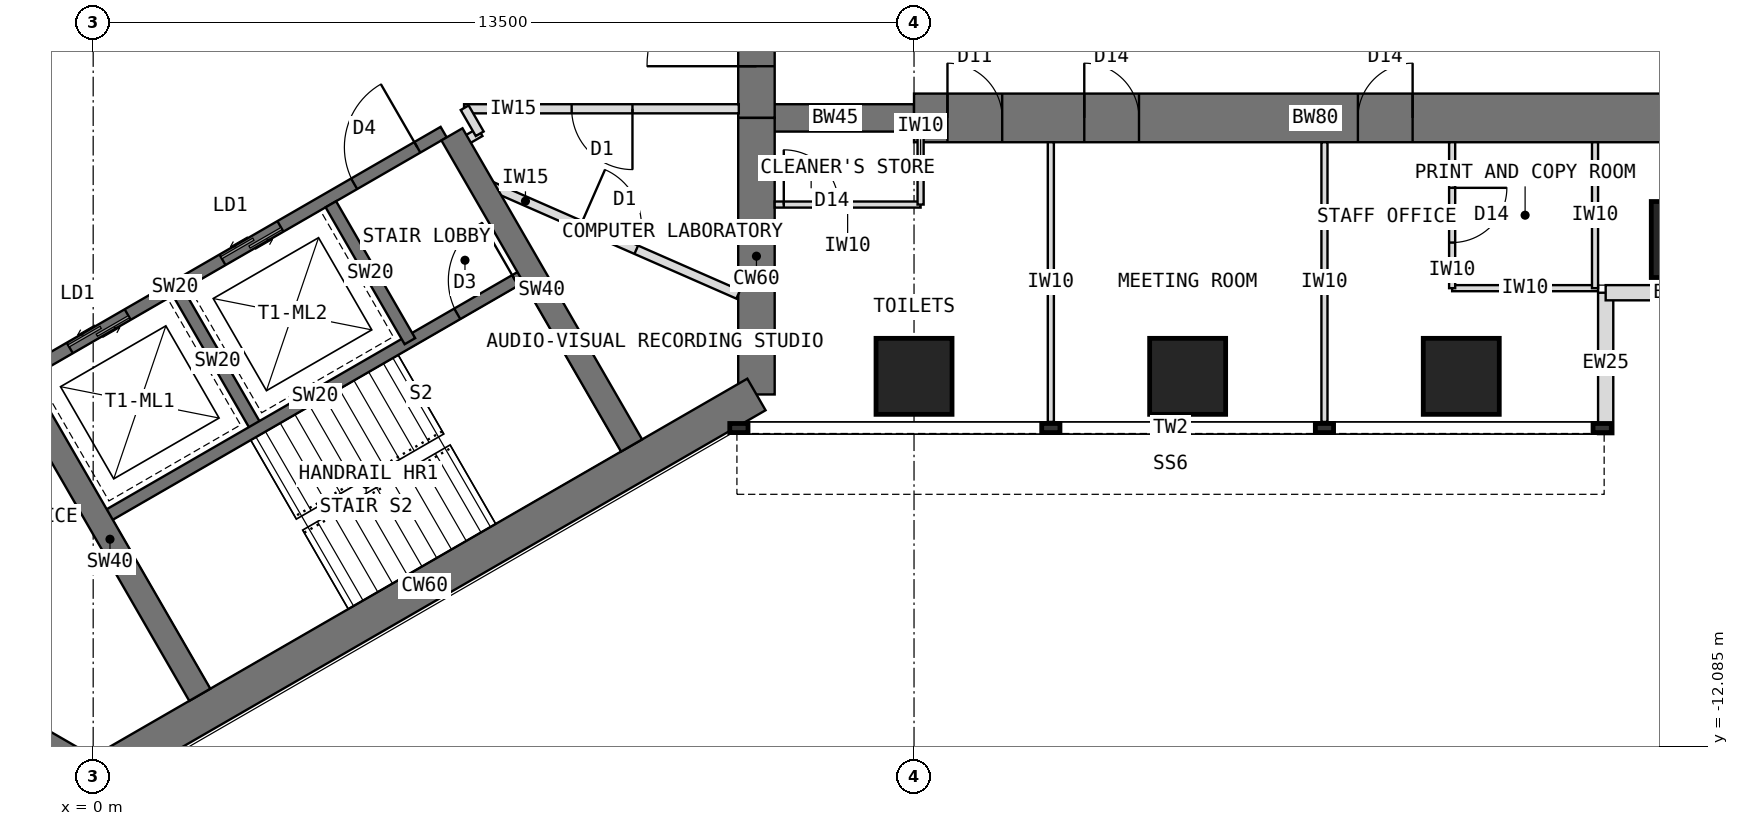
"""IFC4 building model, lengths in metres.
Left out: names, types, materials, properties, quantities, classifications, styles, units other than length and angle.
Written with IfcOpenShell. Run it as: python <this file> out.ifc"""

import sys

from ifc_helpers import new_model, si_unit, direction, frame, frame_2d, origin, origin_2d, place, context, subcontext, project, spatial, rectangle, extrude, element, fill, save


model = new_model("IFC4")
c1 = context("Model", 3, precision=1e-05, world=origin(), true_north=direction((0.0, 1.0)))
c2 = subcontext(c1, "Body", "Model", "MODEL_VIEW")
j1 = project(units=[si_unit("LENGTHUNIT", "METRE"), si_unit("PLANEANGLEUNIT", "RADIAN")], contexts=[c1])
p1 = place(None, origin())
s1 = spatial("IfcSite", under=j1, at=p1, CompositionType="ELEMENT")
p2 = place(p1, origin())
s2 = spatial("IfcBuilding", under=s1, at=p2, CompositionType="ELEMENT")
p3 = place(p2, frame((0.0, 0.0, 145.5)))
s3 = spatial("IfcBuildingStorey", under=s2, at=p3, CompositionType="ELEMENT", Elevation=145.5)
p4 = place(p3, frame((10.908, -6.298, 0.0), z_axis=(0.0, 0.0, 1.0), x_axis=(0.0, 1.0, 0.0)))
e1 = element("IfcWall", 1, at=p4, inside=s3, PredefinedType="SHEAR", context=c2, shape_type="SweptSolid", body=[
    extrude(rectangle(XDim=4.548, YDim=0.6, at=frame_2d((2.274, 0.0))), origin(), (0.0, 0.0, 1.0), 4.0),
])
p5 = place(p3, frame((10.908, -1.75, 0.0), z_axis=(0.0, 0.0, 1.0), x_axis=(0.0, 1.0, 0.0)))
e2 = element("IfcWall", 2, at=p5, inside=s3, PredefinedType="SHEAR", context=c2, shape_type="SweptSolid", body=[
    extrude(rectangle(XDim=3.5, YDim=0.6, at=frame_2d((1.75, 0.0))), origin(), (0.0, 0.0, 1.0), 4.0),
])
p6 = place(p5, frame((0.85, 0.0, 0.0)))
e3 = element("IfcOpeningElement", 3, at=p6, cuts=e2, PredefinedType="OPENING", context=c2, shape_type="SweptSolid", body=[
    extrude(rectangle(XDim=1.8, YDim=2.1, at=frame_2d((0.9, 1.05))), frame((0.0, 0.31, 0.0), z_axis=(0.0, -1.0, 0.0), x_axis=(1.0, 0.0, 0.0)), (0.0, 0.0, 1.0), 0.62),
])
p7 = place(p3, frame((-3.939, -10.322, 0.0), z_axis=(0.0, 0.0, 1.0), x_axis=(0.866011268655, -0.500024481964, 0.0)))
e4 = element("IfcWall", 4, at=p7, inside=s3, PredefinedType="SHEAR", context=c2, shape_type="SweptSolid", body=[
    extrude(rectangle(XDim=4.548, YDim=0.6, at=frame_2d((2.274, 0.0))), origin(), (0.0, 0.0, 1.0), 4.0),
])
p8 = place(p3, frame((0.0, -12.596, 0.0), z_axis=(0.0, 0.0, 1.0), x_axis=(0.866021940709, 0.500005998175, 0.0)))
e5 = element("IfcWall", 5, at=p8, inside=s3, PredefinedType="SHEAR", context=c2, shape_type="SweptSolid", body=[
    extrude(rectangle(XDim=12.596, YDim=0.6, at=frame_2d((6.298, 0.0))), origin(), (0.0, 0.0, 1.0), 4.0),
])
p9 = place(p3, frame((10.908, -1.75, 0.0), z_axis=(0.0, 0.0, 1.0), x_axis=(1.0, 0.0, 0.0)))
e6 = element("IfcWall", 6, at=p9, inside=s3, PredefinedType="SHEAR", context=c2, shape_type="SweptSolid", body=[
    extrude(rectangle(XDim=2.592, YDim=0.45, at=frame_2d((1.296, 0.0))), origin(), (0.0, 0.0, 1.0), 4.0),
])
p10 = place(p3, frame((13.5, -1.75, 0.0), z_axis=(0.0, 0.0, 1.0), x_axis=(1.0, 0.0, 0.0)))
e7 = element("IfcWall", 7, at=p10, inside=s3, PredefinedType="SHEAR", context=c2, shape_type="SweptSolid", body=[
    extrude(rectangle(XDim=13.2, YDim=0.8, at=frame_2d((6.6, 0.0))), origin(), (0.0, 0.0, 1.0), 4.0),
])
p11 = place(p10, frame((0.55, 0.0, 0.0)))
e8 = element("IfcOpeningElement", 8, at=p11, cuts=e7, PredefinedType="OPENING", context=c2, shape_type="SweptSolid", body=[
    extrude(rectangle(XDim=0.9, YDim=2.1, at=frame_2d((0.45, 1.05))), frame((0.0, 0.41, 0.0), z_axis=(0.0, -1.0, 0.0), x_axis=(1.0, 0.0, 0.0)), (0.0, 0.0, 1.0), 0.82),
])
p12 = place(p10, frame((2.8, 0.0, 0.0)))
e9 = element("IfcOpeningElement", 9, at=p12, cuts=e7, PredefinedType="OPENING", context=c2, shape_type="SweptSolid", body=[
    extrude(rectangle(XDim=0.9, YDim=2.1, at=frame_2d((0.45, 1.05))), frame((0.0, 0.41, 0.0), z_axis=(0.0, -1.0, 0.0), x_axis=(1.0, 0.0, 0.0)), (0.0, 0.0, 1.0), 0.82),
])
p13 = place(p10, frame((7.3, 0.0, 0.0)))
e10 = element("IfcOpeningElement", 10, at=p13, cuts=e7, PredefinedType="OPENING", context=c2, shape_type="SweptSolid", body=[
    extrude(rectangle(XDim=0.9, YDim=2.1, at=frame_2d((0.45, 1.05))), frame((0.0, 0.41, 0.0), z_axis=(0.0, -1.0, 0.0), x_axis=(1.0, 0.0, 0.0)), (0.0, 0.0, 1.0), 0.82),
])
for number, where, z_axis, x_axis in (
    (11, (13.5, -6.0, 0.0), (0.0, 0.0, 1.0), (1.0, 0.0, 0.0)),
    (12, (18.0, -6.0, 0.0), (0.0, 0.0, 1.0), (1.0, 0.0, 0.0)),
    (13, (22.5, -6.0, 0.0), (0.0, 0.0, 1.0), (1.0, 0.0, 0.0)),
    (14, (26.25, -3.75, 0.0), (0.0, 0.0, 1.0), (1.0, 0.0, 0.0)),
):
    element("IfcColumn", number, at=place(p3, frame(where, z_axis=z_axis, x_axis=x_axis)), inside=s3, PredefinedType="COLUMN", context=c2, shape_type="SweptSolid", body=[
        extrude(rectangle(XDim=1.25, YDim=1.25, at=origin_2d()), origin(), (0.0, 0.0, 1.0), 4.0),
    ])
for number, where, z_axis, x_axis in (
    (15, (24.875, -6.95, 0.0), (0.0, 0.0, 1.0), (0.0, 1.0, 0.0)),
    (16, (24.875, -4.625, 0.0), (0.0, 0.0, 1.0), (1.0, 0.0, 0.0)),
):
    element("IfcWall", number, at=place(p3, frame(where, z_axis=z_axis, x_axis=x_axis)), inside=s3, PredefinedType="STANDARD", context=c2, shape_type="SweptSolid", body=[
        extrude(rectangle(XDim=2.325, YDim=0.25, at=frame_2d((1.163, 0.0))), origin(), (0.0, 0.0, 1.0), 3.8),
    ])
p14 = place(p3, frame((-1.164, -5.984, 0.0), z_axis=(0.0, 0.0, 1.0), x_axis=(0.866026010844, 0.49999894854, 0.0)))
e17 = element("IfcWall", 17, at=p14, inside=s3, PredefinedType="SHEAR", context=c2, shape_type="SweptSolid", body=[
    extrude(rectangle(XDim=8.0, YDim=0.2, at=frame_2d((4.0, 0.0))), origin(), (0.0, 0.0, 1.0), 4.0),
])
p15 = place(p14, frame((6.3, 0.0, 0.0)))
e18 = element("IfcOpeningElement", 18, at=p15, cuts=e17, PredefinedType="OPENING", context=c2, shape_type="SweptSolid", body=[
    extrude(rectangle(XDim=1.2, YDim=2.1, at=frame_2d((0.6, 1.05))), frame((0.0, 0.11, 0.0), z_axis=(0.0, -1.0, 0.0), x_axis=(1.0, 0.0, 0.0)), (0.0, 0.0, 1.0), 0.22),
])
p16 = place(p14, frame((0.9, 0.0, 0.0)))
e19 = element("IfcOpeningElement", 19, at=p16, cuts=e17, PredefinedType="OPENING", context=c2, shape_type="SweptSolid", body=[
    extrude(rectangle(XDim=1.1, YDim=2.2, at=frame_2d((0.55, 1.1))), frame((0.0, 0.11, 0.0), z_axis=(0.0, -1.0, 0.0), x_axis=(1.0, 0.0, 0.0)), (0.0, 0.0, 1.0), 0.22),
])
p17 = place(p14, frame((3.8, 0.0, 0.0)))
e20 = element("IfcOpeningElement", 20, at=p17, cuts=e17, PredefinedType="OPENING", context=c2, shape_type="SweptSolid", body=[
    extrude(rectangle(XDim=1.1, YDim=2.2, at=frame_2d((0.55, 1.1))), frame((0.0, 0.11, 0.0), z_axis=(0.0, -1.0, 0.0), x_axis=(1.0, 0.0, 0.0)), (0.0, 0.0, 1.0), 0.22),
])
p18 = place(p3, frame((1.397, -4.62, 0.0), z_axis=(0.0, 0.0, 1.0), x_axis=(0.499936506574, -0.866062058628, 0.0)))
e21 = element("IfcWall", 21, at=p18, inside=s3, PredefinedType="SHEAR", context=c2, shape_type="SweptSolid", body=[
    extrude(rectangle(XDim=2.6, YDim=0.2, at=frame_2d((1.3, 0.0))), origin(), (0.0, 0.0, 1.0), 4.0),
])
p19 = place(p3, frame((3.909, -3.17, 0.0), z_axis=(0.0, 0.0, 1.0), x_axis=(0.49997716683, -0.86603858612, 0.0)))
e22 = element("IfcWall", 22, at=p19, inside=s3, PredefinedType="SHEAR", context=c2, shape_type="SweptSolid", body=[
    extrude(rectangle(XDim=2.6, YDim=0.2, at=frame_2d((1.3, 0.0))), origin(), (0.0, 0.0, 1.0), 4.0),
])
p20 = place(p3, frame((0.186, -8.322, 0.0), z_axis=(0.0, 0.0, 1.0), x_axis=(0.866026010844, 0.49999894854, 0.0)))
e23 = element("IfcWall", 23, at=p20, inside=s3, PredefinedType="SHEAR", context=c2, shape_type="SweptSolid", body=[
    extrude(rectangle(XDim=8.0, YDim=0.2, at=frame_2d((4.0, 0.0))), origin(), (0.0, 0.0, 1.0), 4.0),
])
p21 = place(p20, frame((6.7, 0.0, 0.0)))
e24 = element("IfcOpeningElement", 24, at=p21, cuts=e23, PredefinedType="OPENING", context=c2, shape_type="SweptSolid", body=[
    extrude(rectangle(XDim=1.1, YDim=2.1, at=frame_2d((0.55, 1.05))), frame((0.0, 0.11, 0.0), z_axis=(0.0, -1.0, 0.0), x_axis=(1.0, 0.0, 0.0)), (0.0, 0.0, 1.0), 0.22),
])
p22 = place(p3, frame((5.901, -2.02, 0.0), z_axis=(0.0, 0.0, 1.0), x_axis=(0.500027676417, -0.866009424208, 0.0)))
e25 = element("IfcWall", 25, at=p22, inside=s3, PredefinedType="SHEAR", context=c2, shape_type="SweptSolid", body=[
    extrude(rectangle(XDim=5.908, YDim=0.4, at=frame_2d((2.954, 0.0))), origin(), (0.0, 0.0, 1.0), 4.0),
])
p23 = place(p3, frame((-1.201, -6.12, 0.0), z_axis=(0.0, 0.0, 1.0), x_axis=(0.49999668571, -0.866027317282, 0.0)))
e26 = element("IfcWall", 26, at=p23, inside=s3, PredefinedType="SHEAR", context=c2, shape_type="SweptSolid", body=[
    extrude(rectangle(XDim=5.908, YDim=0.4, at=frame_2d((2.954, 0.0))), origin(), (0.0, 0.0, 1.0), 4.0),
])
for number, where, z_axis, x_axis in (
    (27, (15.75, -2.15, 0.0), (0.0, 0.0, 1.0), (0.0, -1.0, 0.0)),
    (28, (20.25, -2.15, 0.0), (0.0, 0.0, 1.0), (0.0, -1.0, 0.0)),
):
    element("IfcWall", number, at=place(p3, frame(where, z_axis=z_axis, x_axis=x_axis)), inside=s3, PredefinedType="PARTITIONING", context=c2, shape_type="SweptSolid", body=[
        extrude(rectangle(XDim=4.6, YDim=0.1, at=frame_2d((2.3, 0.0))), origin(), (0.0, 0.0, 1.0), 3.8),
    ])
p24 = place(p3, frame((22.35, -4.55, 0.0), z_axis=(0.0, 0.0, 1.0), x_axis=(1.0, 0.0, 0.0)))
e29 = element("IfcWall", 29, at=p24, inside=s3, PredefinedType="PARTITIONING", context=c2, shape_type="SweptSolid", body=[
    extrude(rectangle(XDim=2.4, YDim=0.1, at=frame_2d((1.2, 0.0))), origin(), (0.0, 0.0, 1.0), 3.8),
])
p25 = place(p3, frame((22.35, -2.15, 0.0), z_axis=(0.0, 0.0, 1.0), x_axis=(0.0, -1.0, 0.0)))
e30 = element("IfcWall", 30, at=p25, inside=s3, PredefinedType="PARTITIONING", context=c2, shape_type="SweptSolid", body=[
    extrude(rectangle(XDim=2.4, YDim=0.1, at=frame_2d((1.2, 0.0))), origin(), (0.0, 0.0, 1.0), 3.8),
])
p26 = place(p25, frame((0.75, 0.0, 0.0)))
e31 = element("IfcOpeningElement", 31, at=p26, cuts=e30, PredefinedType="OPENING", context=c2, shape_type="SweptSolid", body=[
    extrude(rectangle(XDim=0.9, YDim=2.1, at=frame_2d((0.45, 1.05))), frame((0.0, 0.06, 0.0), z_axis=(0.0, -1.0, 0.0), x_axis=(1.0, 0.0, 0.0)), (0.0, 0.0, 1.0), 0.12),
])
p27 = place(p3, frame((24.7, -2.15, 0.0), z_axis=(0.0, 0.0, 1.0), x_axis=(0.0, -1.0, 0.0)))
e32 = element("IfcWall", 32, at=p27, inside=s3, PredefinedType="PARTITIONING", context=c2, shape_type="SweptSolid", body=[
    extrude(rectangle(XDim=2.4, YDim=0.1, at=frame_2d((1.2, 0.0))), origin(), (0.0, 0.0, 1.0), 3.8),
])
p28 = place(p3, frame((11.208, -3.175, 0.0), z_axis=(0.0, 0.0, 1.0), x_axis=(1.0, 0.0, 0.0)))
e33 = element("IfcWall", 33, at=p28, inside=s3, PredefinedType="PARTITIONING", context=c2, shape_type="SweptSolid", body=[
    extrude(rectangle(XDim=2.4, YDim=0.1, at=frame_2d((1.2, 0.0))), origin(), (0.0, 0.0, 1.0), 3.8),
])
p29 = place(p28, frame((0.15, 0.0, 0.0)))
e34 = element("IfcOpeningElement", 34, at=p29, cuts=e33, PredefinedType="OPENING", context=c2, shape_type="SweptSolid", body=[
    extrude(rectangle(XDim=0.9, YDim=2.1, at=frame_2d((0.45, 1.05))), frame((0.0, 0.06, 0.0), z_axis=(0.0, -1.0, 0.0), x_axis=(1.0, 0.0, 0.0)), (0.0, 0.0, 1.0), 0.12),
])
p30 = place(p3, frame((13.608, -1.975, 0.0), z_axis=(0.0, 0.0, 1.0), x_axis=(0.0, -1.0, 0.0)))
e35 = element("IfcWall", 35, at=p30, inside=s3, PredefinedType="PARTITIONING", context=c2, shape_type="SweptSolid", body=[
    extrude(rectangle(XDim=1.2, YDim=0.1, at=frame_2d((0.6, 0.0))), origin(), (0.0, 0.0, 1.0), 3.8),
])
p31 = place(p3, frame((6.365, -1.983, 0.0), z_axis=(0.0, 0.0, 1.0), x_axis=(-0.865892400268, -0.500230298122, 0.0)))
e36 = element("IfcWall", 36, at=p31, inside=s3, PredefinedType="PARTITIONING", context=c2, shape_type="SweptSolid", body=[
    extrude(rectangle(XDim=0.43, YDim=0.15, at=frame_2d((0.215, 0.0))), origin(), (0.0, 0.0, 1.0), 3.8),
])
p32 = place(p3, frame((10.618, -1.6, 0.0), z_axis=(0.0, 0.0, 1.0), x_axis=(-1.0, 0.0, 0.0)))
e37 = element("IfcWall", 37, at=p32, inside=s3, PredefinedType="PARTITIONING", context=c2, shape_type="SweptSolid", body=[
    extrude(rectangle(XDim=4.519, YDim=0.15, at=frame_2d((2.259, 0.0))), origin(), (0.0, 0.0, 1.0), 3.8),
])
p33 = place(p32, frame((1.749, 0.0, 0.0)))
e38 = element("IfcOpeningElement", 38, at=p33, cuts=e37, PredefinedType="OPENING", context=c2, shape_type="SweptSolid", body=[
    extrude(rectangle(XDim=1.0, YDim=2.1, at=frame_2d((0.5, 1.05))), frame((0.0, 0.085, 0.0), z_axis=(0.0, -1.0, 0.0), x_axis=(1.0, 0.0, 0.0)), (0.0, 0.0, 1.0), 0.17),
])
p34 = place(p3, frame((6.11, -1.583, 0.0), z_axis=(0.0, 0.0, 1.0), x_axis=(0.50033519877, -0.865831790172, 0.0)))
e39 = element("IfcWall", 39, at=p34, inside=s3, PredefinedType="PARTITIONING", context=c2, shape_type="SweptSolid", body=[
    extrude(rectangle(XDim=0.494, YDim=0.15, at=frame_2d((0.247, 0.0))), origin(), (0.0, 0.0, 1.0), 3.8),
])
p35 = place(p3, frame((6.34, -2.781, 0.0), z_axis=(0.0, 0.0, 1.0), x_axis=(0.915777054116, -0.401686926791, 0.0)))
e40 = element("IfcWall", 40, at=p35, inside=s3, PredefinedType="PARTITIONING", context=c2, shape_type="SweptSolid", body=[
    extrude(rectangle(XDim=4.661, YDim=0.15, at=frame_2d((2.331, 0.0))), origin(), (0.0, 0.0, 1.0), 3.8),
])
p36 = place(p35, frame((1.831, 0.0, 0.0)))
e41 = element("IfcOpeningElement", 41, at=p36, cuts=e40, PredefinedType="OPENING", context=c2, shape_type="SweptSolid", body=[
    extrude(rectangle(XDim=1.0, YDim=2.1, at=frame_2d((0.5, 1.05))), frame((0.0, 0.085, 0.0), z_axis=(0.0, -1.0, 0.0), x_axis=(1.0, 0.0, 0.0)), (0.0, 0.0, 1.0), 0.17),
])
p37 = place(p15, origin())
e42 = element("IfcDoor", 42, at=p37, inside=s3, OperationType="SINGLE_SWING_RIGHT", PredefinedType="DOOR", context=c2, shape_type="SweptSolid", body=[
    extrude(rectangle(XDim=1.2, YDim=2.1, at=frame_2d((0.6, 1.05))), frame((0.0, 0.025, 0.0), z_axis=(0.0, -1.0, 0.0), x_axis=(1.0, 0.0, 0.0)), (0.0, 0.0, 1.0), 0.05),
])
fill(e18, e42)
p38 = place(p16, origin())
e43 = element("IfcDoor", 43, at=p38, inside=s3, OperationType="DOUBLE_DOOR_SLIDING", PredefinedType="DOOR", context=c2, shape_type="SweptSolid", body=[
    extrude(rectangle(XDim=1.1, YDim=2.2, at=frame_2d((0.55, 1.1))), frame((0.0, 0.025, 0.0), z_axis=(0.0, -1.0, 0.0), x_axis=(1.0, 0.0, 0.0)), (0.0, 0.0, 1.0), 0.05),
])
fill(e19, e43)
p39 = place(p17, origin())
e44 = element("IfcDoor", 44, at=p39, inside=s3, OperationType="DOUBLE_DOOR_SLIDING", PredefinedType="DOOR", context=c2, shape_type="SweptSolid", body=[
    extrude(rectangle(XDim=1.1, YDim=2.2, at=frame_2d((0.55, 1.1))), frame((0.0, 0.025, 0.0), z_axis=(0.0, -1.0, 0.0), x_axis=(1.0, 0.0, 0.0)), (0.0, 0.0, 1.0), 0.05),
])
fill(e20, e44)
p40 = place(p21, origin())
e45 = element("IfcDoor", 45, at=p40, inside=s3, OperationType="SINGLE_SWING_RIGHT", PredefinedType="DOOR", context=c2, shape_type="SweptSolid", body=[
    extrude(rectangle(XDim=1.1, YDim=2.1, at=frame_2d((0.55, 1.05))), frame((0.0, 0.025, 0.0), z_axis=(0.0, -1.0, 0.0), x_axis=(1.0, 0.0, 0.0)), (0.0, 0.0, 1.0), 0.05),
])
fill(e24, e45)
p41 = place(p6, origin())
e46 = element("IfcDoor", 46, at=p41, inside=s3, OperationType="DOUBLE_DOOR_DOUBLE_SWING", PredefinedType="DOOR", context=c2, shape_type="SweptSolid", body=[
    extrude(rectangle(XDim=1.72, YDim=2.06, at=frame_2d((0.9, 1.03))), frame((0.0, 0.025, 0.0), z_axis=(0.0, -1.0, 0.0), x_axis=(1.0, 0.0, 0.0)), (0.0, 0.0, 1.0), 0.05),
    extrude(rectangle(XDim=0.04, YDim=2.1, at=frame_2d((0.02, 1.05))), frame((0.0, 0.3, 0.0), z_axis=(0.0, -1.0, 0.0), x_axis=(1.0, 0.0, 0.0)), (0.0, 0.0, 1.0), 0.6),
    extrude(rectangle(XDim=0.04, YDim=2.1, at=frame_2d((1.78, 1.05))), frame((0.0, 0.3, 0.0), z_axis=(0.0, -1.0, 0.0), x_axis=(1.0, 0.0, 0.0)), (0.0, 0.0, 1.0), 0.6),
    extrude(rectangle(XDim=1.72, YDim=0.04, at=frame_2d((0.9, 2.08))), frame((0.0, 0.3, 0.0), z_axis=(0.0, -1.0, 0.0), x_axis=(1.0, 0.0, 0.0)), (0.0, 0.0, 1.0), 0.6),
])
fill(e3, e46)
p42 = place(p26, origin())
e47 = element("IfcDoor", 47, at=p42, inside=s3, OperationType="SINGLE_SWING_LEFT", PredefinedType="DOOR", context=c2, shape_type="SweptSolid", body=[
    extrude(rectangle(XDim=0.9, YDim=2.1, at=frame_2d((0.45, 1.05))), frame((0.0, 0.025, 0.0), z_axis=(0.0, -1.0, 0.0), x_axis=(1.0, 0.0, 0.0)), (0.0, 0.0, 1.0), 0.05),
])
fill(e31, e47)
p43 = place(p29, origin())
e48 = element("IfcDoor", 48, at=p43, inside=s3, OperationType="SINGLE_SWING_LEFT", PredefinedType="DOOR", context=c2, shape_type="SweptSolid", body=[
    extrude(rectangle(XDim=0.9, YDim=2.1, at=frame_2d((0.45, 1.05))), frame((0.0, 0.025, 0.0), z_axis=(0.0, -1.0, 0.0), x_axis=(1.0, 0.0, 0.0)), (0.0, 0.0, 1.0), 0.05),
])
fill(e34, e48)
p44 = place(p33, origin())
e49 = element("IfcDoor", 49, at=p44, inside=s3, OperationType="SINGLE_SWING_LEFT", PredefinedType="DOOR", context=c2, shape_type="SweptSolid", body=[
    extrude(rectangle(XDim=1.0, YDim=2.1, at=frame_2d((0.5, 1.05))), frame((0.0, 0.025, 0.0), z_axis=(0.0, -1.0, 0.0), x_axis=(1.0, 0.0, 0.0)), (0.0, 0.0, 1.0), 0.05),
])
fill(e38, e49)
p45 = place(p36, origin())
e50 = element("IfcDoor", 50, at=p45, inside=s3, OperationType="SINGLE_SWING_LEFT", PredefinedType="DOOR", context=c2, shape_type="SweptSolid", body=[
    extrude(rectangle(XDim=1.0, YDim=2.1, at=frame_2d((0.5, 1.05))), frame((0.0, 0.025, 0.0), z_axis=(0.0, -1.0, 0.0), x_axis=(1.0, 0.0, 0.0)), (0.0, 0.0, 1.0), 0.05),
])
fill(e41, e50)
p46 = place(p11, origin())
e51 = element("IfcDoor", 51, at=p46, inside=s3, OperationType="SINGLE_SWING_LEFT", PredefinedType="DOOR", context=c2, shape_type="SweptSolid", body=[
    extrude(rectangle(XDim=0.82, YDim=2.06, at=frame_2d((0.45, 1.03))), frame((0.0, 0.025, 0.0), z_axis=(0.0, -1.0, 0.0), x_axis=(1.0, 0.0, 0.0)), (0.0, 0.0, 1.0), 0.05),
    extrude(rectangle(XDim=0.04, YDim=2.1, at=frame_2d((0.02, 1.05))), frame((0.0, 0.4, 0.0), z_axis=(0.0, -1.0, 0.0), x_axis=(1.0, 0.0, 0.0)), (0.0, 0.0, 1.0), 0.8),
    extrude(rectangle(XDim=0.04, YDim=2.1, at=frame_2d((0.88, 1.05))), frame((0.0, 0.4, 0.0), z_axis=(0.0, -1.0, 0.0), x_axis=(1.0, 0.0, 0.0)), (0.0, 0.0, 1.0), 0.8),
    extrude(rectangle(XDim=0.82, YDim=0.04, at=frame_2d((0.45, 2.08))), frame((0.0, 0.4, 0.0), z_axis=(0.0, -1.0, 0.0), x_axis=(1.0, 0.0, 0.0)), (0.0, 0.0, 1.0), 0.8),
])
fill(e8, e51)
p47 = place(p12, origin())
e52 = element("IfcDoor", 52, at=p47, inside=s3, OperationType="SINGLE_SWING_LEFT", PredefinedType="DOOR", context=c2, shape_type="SweptSolid", body=[
    extrude(rectangle(XDim=0.82, YDim=2.06, at=frame_2d((0.45, 1.03))), frame((0.0, 0.025, 0.0), z_axis=(0.0, -1.0, 0.0), x_axis=(1.0, 0.0, 0.0)), (0.0, 0.0, 1.0), 0.05),
    extrude(rectangle(XDim=0.04, YDim=2.1, at=frame_2d((0.02, 1.05))), frame((0.0, 0.4, 0.0), z_axis=(0.0, -1.0, 0.0), x_axis=(1.0, 0.0, 0.0)), (0.0, 0.0, 1.0), 0.8),
    extrude(rectangle(XDim=0.04, YDim=2.1, at=frame_2d((0.88, 1.05))), frame((0.0, 0.4, 0.0), z_axis=(0.0, -1.0, 0.0), x_axis=(1.0, 0.0, 0.0)), (0.0, 0.0, 1.0), 0.8),
    extrude(rectangle(XDim=0.82, YDim=0.04, at=frame_2d((0.45, 2.08))), frame((0.0, 0.4, 0.0), z_axis=(0.0, -1.0, 0.0), x_axis=(1.0, 0.0, 0.0)), (0.0, 0.0, 1.0), 0.8),
])
fill(e9, e52)
p48 = place(p13, origin())
e53 = element("IfcDoor", 53, at=p48, inside=s3, OperationType="SINGLE_SWING_RIGHT", PredefinedType="DOOR", context=c2, shape_type="SweptSolid", body=[
    extrude(rectangle(XDim=0.82, YDim=2.06, at=frame_2d((0.45, 1.03))), frame((0.0, 0.025, 0.0), z_axis=(0.0, -1.0, 0.0), x_axis=(1.0, 0.0, 0.0)), (0.0, 0.0, 1.0), 0.05),
    extrude(rectangle(XDim=0.04, YDim=2.1, at=frame_2d((0.02, 1.05))), frame((0.0, 0.4, 0.0), z_axis=(0.0, -1.0, 0.0), x_axis=(1.0, 0.0, 0.0)), (0.0, 0.0, 1.0), 0.8),
    extrude(rectangle(XDim=0.04, YDim=2.1, at=frame_2d((0.88, 1.05))), frame((0.0, 0.4, 0.0), z_axis=(0.0, -1.0, 0.0), x_axis=(1.0, 0.0, 0.0)), (0.0, 0.0, 1.0), 0.8),
    extrude(rectangle(XDim=0.82, YDim=0.04, at=frame_2d((0.45, 2.08))), frame((0.0, 0.4, 0.0), z_axis=(0.0, -1.0, 0.0), x_axis=(1.0, 0.0, 0.0)), (0.0, 0.0, 1.0), 0.8),
])
fill(e10, e53)
save(model, sys.argv[1])
